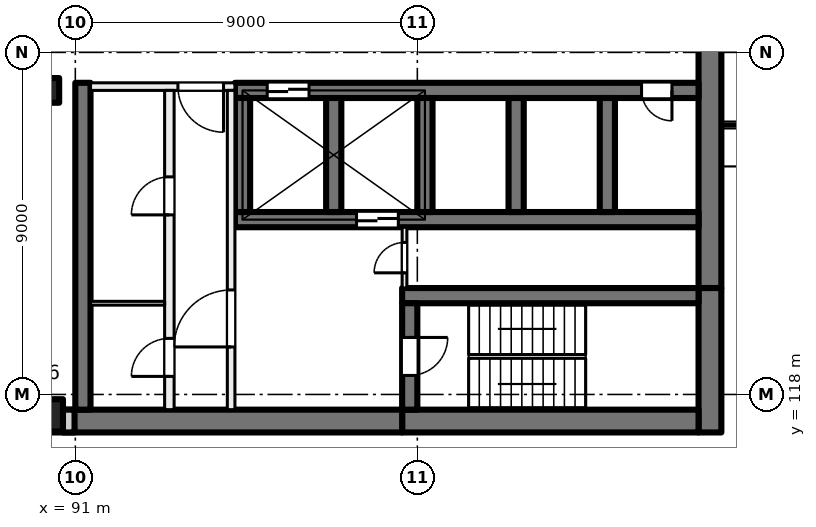
"""IFC4 building model, lengths in metres.
Left out: names, types, materials, properties, quantities, classifications, styles, units other than length and angle.
Written with IfcOpenShell. Run it as: python <this file> out.ifc"""

import sys

from ifc_helpers import new_model, si_unit, direction, frame, frame_2d, origin, origin_2d, place, context, subcontext, project, spatial, rectangle, extrude, element, fill, save


model = new_model("IFC4")
c1 = context("Model", 3, precision=1e-05, world=origin(), true_north=direction((0.0, 1.0)))
c2 = subcontext(c1, "Body", "Model", "MODEL_VIEW")
j1 = project(units=[si_unit("LENGTHUNIT", "METRE"), si_unit("PLANEANGLEUNIT", "RADIAN")], contexts=[c1])
p1 = place(None, origin())
s1 = spatial("IfcSite", under=j1, at=p1, CompositionType="ELEMENT")
p2 = place(p1, origin())
s2 = spatial("IfcBuilding", under=s1, at=p2, CompositionType="ELEMENT")
p3 = place(p2, frame((0.0, 0.0, 109.0)))
s3 = spatial("IfcBuildingStorey", under=s2, at=p3, CompositionType="ELEMENT", Elevation=109.0)
p4 = place(p3, frame((90.25, 126.0, 0.0), z_axis=(0.0, 0.0, 1.0), x_axis=(1.0, 0.0, 0.0)))
e1 = element("IfcColumn", 1, at=p4, inside=s3, PredefinedType="COLUMN", context=c2, shape_type="SweptSolid", body=[
    extrude(rectangle(XDim=0.65, YDim=0.65, at=origin_2d()), origin(), (0.0, 0.0, 1.0), 4.0),
])
p5 = place(p3, frame((90.25, 117.45, 0.0), z_axis=(0.0, 0.0, 1.0), x_axis=(1.0, 0.0, 0.0)))
e2 = element("IfcColumn", 2, at=p5, inside=s3, PredefinedType="COLUMN", context=c2, shape_type="SweptSolid", body=[
    extrude(rectangle(XDim=0.85, YDim=0.85, at=origin_2d()), origin(), (0.0, 0.0, 1.0), 4.0),
])
p6 = place(p3, frame((107.7, 135.2, 0.0), z_axis=(0.0, 0.0, 1.0), x_axis=(0.0, -1.0, 0.0)))
e3 = element("IfcWall", 3, at=p6, inside=s3, PredefinedType="SHEAR", context=c2, shape_type="SweptSolid", body=[
    extrude(rectangle(XDim=14.4, YDim=0.6, at=frame_2d((7.2, 0.0))), origin(), (0.0, 0.0, 1.0), 4.0),
])
p7 = place(p6, frame((6.3, 0.0, 0.0)))
e4 = element("IfcOpeningElement", 4, at=p7, cuts=e3, PredefinedType="OPENING", context=c2, shape_type="SweptSolid", body=[
    extrude(rectangle(XDim=1.8, YDim=2.1, at=frame_2d((0.9, 1.05))), frame((0.0, 0.31, 0.0), z_axis=(0.0, -1.0, 0.0), x_axis=(1.0, 0.0, 0.0)), (0.0, 0.0, 1.0), 0.62),
])
p8 = place(p3, frame((107.7, 120.8, 0.0), z_axis=(0.0, 0.0, 1.0), x_axis=(0.0, -1.0, 0.0)))
e5 = element("IfcWall", 5, at=p8, inside=s3, PredefinedType="SHEAR", context=c2, shape_type="SweptSolid", body=[
    extrude(rectangle(XDim=3.8, YDim=0.6, at=frame_2d((1.9, 0.0))), origin(), (0.0, 0.0, 1.0), 4.0),
])
p9 = place(p3, frame((107.4, 117.3, 0.0), z_axis=(0.0, 0.0, 1.0), x_axis=(-1.0, 0.0, 0.0)))
e6 = element("IfcWall", 6, at=p9, inside=s3, PredefinedType="SHEAR", context=c2, shape_type="SweptSolid", body=[
    extrude(rectangle(XDim=7.8, YDim=0.6, at=frame_2d((3.9, 0.0))), origin(), (0.0, 0.0, 1.0), 4.0),
])
p10 = place(p3, frame((99.6, 117.3, 0.0), z_axis=(0.0, 0.0, 1.0), x_axis=(-1.0, 0.0, 0.0)))
e7 = element("IfcWall", 7, at=p10, inside=s3, PredefinedType="SHEAR", context=c2, shape_type="SweptSolid", body=[
    extrude(rectangle(XDim=8.925, YDim=0.6, at=frame_2d((4.462, 0.0))), origin(), (0.0, 0.0, 1.0), 4.0),
])
p11 = place(p3, frame((107.4, 120.6, 0.0), z_axis=(0.0, 0.0, 1.0), x_axis=(-1.0, 0.0, 0.0)))
e8 = element("IfcWall", 8, at=p11, inside=s3, PredefinedType="SHEAR", context=c2, shape_type="SweptSolid", body=[
    extrude(rectangle(XDim=7.8, YDim=0.4, at=frame_2d((3.9, 0.0))), origin(), (0.0, 0.0, 1.0), 4.0),
])
p12 = place(p3, frame((99.8, 120.4, 0.0), z_axis=(0.0, 0.0, 1.0), x_axis=(0.0, -1.0, 0.0)))
e9 = element("IfcWall", 9, at=p12, inside=s3, PredefinedType="SHEAR", context=c2, shape_type="SweptSolid", body=[
    extrude(rectangle(XDim=2.8, YDim=0.4, at=frame_2d((1.4, 0.0))), origin(), (0.0, 0.0, 1.0), 4.0),
])
p13 = place(p12, frame((0.9, 0.0, 0.0)))
e10 = element("IfcOpeningElement", 10, at=p13, cuts=e9, PredefinedType="OPENING", context=c2, shape_type="SweptSolid", body=[
    extrude(rectangle(XDim=1.0, YDim=2.1, at=frame_2d((0.5, 1.05))), frame((0.0, 0.21, 0.0), z_axis=(0.0, -1.0, 0.0), x_axis=(1.0, 0.0, 0.0)), (0.0, 0.0, 1.0), 0.42),
])
p14 = place(p3, frame((107.4, 126.0, 0.0), z_axis=(0.0, 0.0, 1.0), x_axis=(-1.0, 0.0, 0.0)))
e11 = element("IfcWall", 11, at=p14, inside=s3, PredefinedType="SHEAR", context=c2, shape_type="SweptSolid", body=[
    extrude(rectangle(XDim=12.2, YDim=0.4, at=frame_2d((6.1, 0.0))), origin(), (0.0, 0.0, 1.0), 4.0),
])
p15 = place(p14, frame((10.25, 0.0, 0.0)))
e12 = element("IfcOpeningElement", 12, at=p15, cuts=e11, PredefinedType="OPENING", context=c2, shape_type="SweptSolid", body=[
    extrude(rectangle(XDim=1.1, YDim=2.1, at=frame_2d((0.55, 1.05))), frame((0.0, 0.21, 0.0), z_axis=(0.0, -1.0, 0.0), x_axis=(1.0, 0.0, 0.0)), (0.0, 0.0, 1.0), 0.42),
])
p16 = place(p14, frame((0.7, 0.0, 0.0)))
e13 = element("IfcOpeningElement", 13, at=p16, cuts=e11, PredefinedType="OPENING", context=c2, shape_type="SweptSolid", body=[
    extrude(rectangle(XDim=0.8, YDim=2.1, at=frame_2d((0.4, 1.05))), frame((0.0, 0.21, 0.0), z_axis=(0.0, -1.0, 0.0), x_axis=(1.0, 0.0, 0.0)), (0.0, 0.0, 1.0), 0.42),
])
p17 = place(p3, frame((107.4, 122.6, 0.0), z_axis=(0.0, 0.0, 1.0), x_axis=(-1.0, 0.0, 0.0)))
e14 = element("IfcWall", 14, at=p17, inside=s3, PredefinedType="SHEAR", context=c2, shape_type="SweptSolid", body=[
    extrude(rectangle(XDim=12.2, YDim=0.4, at=frame_2d((6.1, 0.0))), origin(), (0.0, 0.0, 1.0), 4.0),
])
p18 = place(p17, frame((7.9, 0.0, 0.0)))
e15 = element("IfcOpeningElement", 15, at=p18, cuts=e14, PredefinedType="OPENING", context=c2, shape_type="SweptSolid", body=[
    extrude(rectangle(XDim=1.1, YDim=2.1, at=frame_2d((0.55, 1.05))), frame((0.0, 0.21, 0.0), z_axis=(0.0, -1.0, 0.0), x_axis=(1.0, 0.0, 0.0)), (0.0, 0.0, 1.0), 0.42),
])
for number, where, z_axis, x_axis in (
    (16, (105.0, 125.8, 0.0), (0.0, 0.0, 1.0), (0.0, -1.0, 0.0)),
    (17, (102.6, 125.8, 0.0), (0.0, 0.0, 1.0), (0.0, -1.0, 0.0)),
    (18, (100.2, 125.8, 0.0), (0.0, 0.0, 1.0), (0.0, -1.0, 0.0)),
    (19, (97.8, 125.8, 0.0), (0.0, 0.0, 1.0), (0.0, -1.0, 0.0)),
    (20, (95.4, 125.8, 0.0), (0.0, 0.0, 1.0), (0.0, -1.0, 0.0)),
):
    element("IfcWall", number, at=place(p3, frame(where, z_axis=z_axis, x_axis=x_axis)), inside=s3, PredefinedType="SHEAR", context=c2, shape_type="SweptSolid", body=[
        extrude(rectangle(XDim=3.0, YDim=0.4, at=frame_2d((1.5, 0.0))), origin(), (0.0, 0.0, 1.0), 4.0),
    ])
p19 = place(p3, frame((91.2, 126.2, 0.0), z_axis=(0.0, 0.0, 1.0), x_axis=(0.0, -1.0, 0.0)))
e21 = element("IfcWall", 21, at=p19, inside=s3, PredefinedType="SHEAR", context=c2, shape_type="SweptSolid", body=[
    extrude(rectangle(XDim=8.6, YDim=0.4, at=frame_2d((4.3, 0.0))), origin(), (0.0, 0.0, 1.0), 4.0),
])
p20 = place(p3, frame((90.98, 117.3, 0.0), z_axis=(0.0, 0.0, 1.0), x_axis=(-1.0, 0.0, 0.0)))
e22 = element("IfcWall", 22, at=p20, inside=s3, PredefinedType="SOLIDWALL", context=c2, shape_type="SweptSolid", body=[
    extrude(rectangle(XDim=32.845, YDim=0.6, at=frame_2d((16.422, 0.0))), origin(), (0.0, 0.0, 1.0), 3.625),
])
p21 = place(p20, frame((1.48, 0.0, 0.9)))
e23 = element("IfcOpeningElement", 23, at=p21, cuts=e22, PredefinedType="OPENING", context=c2, shape_type="SweptSolid", body=[
    extrude(rectangle(XDim=3.0, YDim=2.4, at=frame_2d((1.5, 1.2))), frame((0.0, 0.31, 0.0), z_axis=(0.0, -1.0, 0.0), x_axis=(1.0, 0.0, 0.0)), (0.0, 0.0, 1.0), 0.62),
])
p22 = place(p20, frame((5.98, 0.0, 0.9)))
e24 = element("IfcOpeningElement", 24, at=p22, cuts=e22, PredefinedType="OPENING", context=c2, shape_type="SweptSolid", body=[
    extrude(rectangle(XDim=3.0, YDim=2.4, at=frame_2d((1.5, 1.2))), frame((0.0, 0.31, 0.0), z_axis=(0.0, -1.0, 0.0), x_axis=(1.0, 0.0, 0.0)), (0.0, 0.0, 1.0), 0.62),
])
p23 = place(p20, frame((10.48, 0.0, 0.9)))
e25 = element("IfcOpeningElement", 25, at=p23, cuts=e22, PredefinedType="OPENING", context=c2, shape_type="SweptSolid", body=[
    extrude(rectangle(XDim=3.0, YDim=2.4, at=frame_2d((1.5, 1.2))), frame((0.0, 0.31, 0.0), z_axis=(0.0, -1.0, 0.0), x_axis=(1.0, 0.0, 0.0)), (0.0, 0.0, 1.0), 0.62),
])
p24 = place(p20, frame((14.98, 0.0, 0.9)))
e26 = element("IfcOpeningElement", 26, at=p24, cuts=e22, PredefinedType="OPENING", context=c2, shape_type="SweptSolid", body=[
    extrude(rectangle(XDim=3.0, YDim=2.4, at=frame_2d((1.5, 1.2))), frame((0.0, 0.31, 0.0), z_axis=(0.0, -1.0, 0.0), x_axis=(1.0, 0.0, 0.0)), (0.0, 0.0, 1.0), 0.62),
])
p25 = place(p20, frame((19.48, 0.0, 0.9)))
e27 = element("IfcOpeningElement", 27, at=p25, cuts=e22, PredefinedType="OPENING", context=c2, shape_type="SweptSolid", body=[
    extrude(rectangle(XDim=3.0, YDim=2.4, at=frame_2d((1.5, 1.2))), frame((0.0, 0.31, 0.0), z_axis=(0.0, -1.0, 0.0), x_axis=(1.0, 0.0, 0.0)), (0.0, 0.0, 1.0), 0.62),
])
p26 = place(p20, frame((23.98, 0.0, 0.9)))
e28 = element("IfcOpeningElement", 28, at=p26, cuts=e22, PredefinedType="OPENING", context=c2, shape_type="SweptSolid", body=[
    extrude(rectangle(XDim=3.0, YDim=2.4, at=frame_2d((1.5, 1.2))), frame((0.0, 0.31, 0.0), z_axis=(0.0, -1.0, 0.0), x_axis=(1.0, 0.0, 0.0)), (0.0, 0.0, 1.0), 0.62),
])
p27 = place(p20, frame((28.48, 0.0, 0.9)))
e29 = element("IfcOpeningElement", 29, at=p27, cuts=e22, PredefinedType="OPENING", context=c2, shape_type="SweptSolid", body=[
    extrude(rectangle(XDim=3.0, YDim=2.4, at=frame_2d((1.5, 1.2))), frame((0.0, 0.31, 0.0), z_axis=(0.0, -1.0, 0.0), x_axis=(1.0, 0.0, 0.0)), (0.0, 0.0, 1.0), 0.62),
])
p28 = place(p3, frame((95.2, 126.1, 0.0), z_axis=(0.0, 0.0, 1.0), x_axis=(-1.0, 0.0, 0.0)))
e30 = element("IfcWall", 30, at=p28, inside=s3, PredefinedType="PARTITIONING", context=c2, shape_type="SweptSolid", body=[
    extrude(rectangle(XDim=3.8, YDim=0.2, at=frame_2d((1.9, 0.0))), origin(), (0.0, 0.0, 1.0), 3.625),
])
p29 = place(p28, frame((0.3, 0.0, 0.0)))
e31 = element("IfcOpeningElement", 31, at=p29, cuts=e30, PredefinedType="OPENING", context=c2, shape_type="SweptSolid", body=[
    extrude(rectangle(XDim=1.2, YDim=2.1, at=frame_2d((0.6, 1.05))), frame((0.0, 0.11, 0.0), z_axis=(0.0, -1.0, 0.0), x_axis=(1.0, 0.0, 0.0)), (0.0, 0.0, 1.0), 0.22),
])
p30 = place(p3, frame((95.1, 117.6, 0.0), z_axis=(0.0, 0.0, 1.0), x_axis=(0.0, 1.0, 0.0)))
e32 = element("IfcWall", 32, at=p30, inside=s3, PredefinedType="PARTITIONING", context=c2, shape_type="SweptSolid", body=[
    extrude(rectangle(XDim=8.4, YDim=0.2, at=frame_2d((4.2, 0.0))), origin(), (0.0, 0.0, 1.0), 3.625),
])
p31 = place(p30, frame((1.65, 0.0, 0.0)))
e33 = element("IfcOpeningElement", 33, at=p31, cuts=e32, PredefinedType="OPENING", context=c2, shape_type="SweptSolid", body=[
    extrude(rectangle(XDim=1.5, YDim=2.1, at=frame_2d((0.75, 1.05))), frame((0.0, 0.11, 0.0), z_axis=(0.0, -1.0, 0.0), x_axis=(1.0, 0.0, 0.0)), (0.0, 0.0, 1.0), 0.22),
])
p32 = place(p3, frame((93.475, 117.6, 0.0), z_axis=(0.0, 0.0, 1.0), x_axis=(0.0, 1.0, 0.0)))
e34 = element("IfcWall", 34, at=p32, inside=s3, PredefinedType="PARTITIONING", context=c2, shape_type="SweptSolid", body=[
    extrude(rectangle(XDim=8.4, YDim=0.25, at=frame_2d((4.2, 0.0))), origin(), (0.0, 0.0, 1.0), 3.625),
])
p33 = place(p32, frame((5.125, 0.0, 0.0)))
e35 = element("IfcOpeningElement", 35, at=p33, cuts=e34, PredefinedType="OPENING", context=c2, shape_type="SweptSolid", body=[
    extrude(rectangle(XDim=1.0, YDim=2.1, at=frame_2d((0.5, 1.05))), frame((0.0, 0.135, 0.0), z_axis=(0.0, -1.0, 0.0), x_axis=(1.0, 0.0, 0.0)), (0.0, 0.0, 1.0), 0.27),
])
p34 = place(p32, frame((0.875, 0.0, 0.0)))
e36 = element("IfcOpeningElement", 36, at=p34, cuts=e34, PredefinedType="OPENING", context=c2, shape_type="SweptSolid", body=[
    extrude(rectangle(XDim=1.0, YDim=2.1, at=frame_2d((0.5, 1.05))), frame((0.0, 0.135, 0.0), z_axis=(0.0, -1.0, 0.0), x_axis=(1.0, 0.0, 0.0)), (0.0, 0.0, 1.0), 0.27),
])
p35 = place(p3, frame((99.663, 120.8, 0.0), z_axis=(0.0, 0.0, 1.0), x_axis=(0.0, 1.0, 0.0)))
e37 = element("IfcWall", 37, at=p35, inside=s3, PredefinedType="PARTITIONING", context=c2, shape_type="SweptSolid", body=[
    extrude(rectangle(XDim=1.6, YDim=0.125, at=frame_2d((0.8, 0.0))), origin(), (0.0, 0.0, 1.0), 3.625),
])
p36 = place(p35, frame((0.4, 0.0, 0.0)))
e38 = element("IfcOpeningElement", 38, at=p36, cuts=e37, PredefinedType="OPENING", context=c2, shape_type="SweptSolid", body=[
    extrude(rectangle(XDim=0.8, YDim=2.1, at=frame_2d((0.4, 1.05))), frame((0.0, 0.073, 0.0), z_axis=(0.0, -1.0, 0.0), x_axis=(1.0, 0.0, 0.0)), (0.0, 0.0, 1.0), 0.145),
])
p37 = place(p3, frame((93.35, 120.4, 0.0), z_axis=(0.0, 0.0, 1.0), x_axis=(-1.0, 0.0, 0.0)))
e39 = element("IfcWall", 39, at=p37, inside=s3, PredefinedType="PARTITIONING", context=c2, shape_type="SweptSolid", body=[
    extrude(rectangle(XDim=1.95, YDim=0.1, at=frame_2d((0.975, 0.0))), origin(), (0.0, 0.0, 1.0), 3.625),
])
p38 = place(p15, origin())
e40 = element("IfcDoor", 40, at=p38, inside=s3, OperationType="DOUBLE_DOOR_SLIDING", PredefinedType="DOOR", context=c2, shape_type="SweptSolid", body=[
    extrude(rectangle(XDim=1.1, YDim=2.1, at=frame_2d((0.55, 1.05))), frame((0.0, 0.025, 0.0), z_axis=(0.0, -1.0, 0.0), x_axis=(1.0, 0.0, 0.0)), (0.0, 0.0, 1.0), 0.05),
])
fill(e12, e40)
p39 = place(p16, origin())
e41 = element("IfcDoor", 41, at=p39, inside=s3, OperationType="SINGLE_SWING_LEFT", PredefinedType="DOOR", context=c2, shape_type="SweptSolid", body=[
    extrude(rectangle(XDim=0.8, YDim=2.1, at=frame_2d((0.4, 1.05))), frame((0.0, 0.025, 0.0), z_axis=(0.0, -1.0, 0.0), x_axis=(1.0, 0.0, 0.0)), (0.0, 0.0, 1.0), 0.05),
])
fill(e13, e41)
p40 = place(p29, origin())
e42 = element("IfcDoor", 42, at=p40, inside=s3, OperationType="DOUBLE_DOOR_SINGLE_SWING", PredefinedType="DOOR", context=c2, shape_type="SweptSolid", body=[
    extrude(rectangle(XDim=1.2, YDim=2.1, at=frame_2d((0.6, 1.05))), frame((0.0, 0.025, 0.0), z_axis=(0.0, -1.0, 0.0), x_axis=(1.0, 0.0, 0.0)), (0.0, 0.0, 1.0), 0.05),
])
fill(e31, e42)
p41 = place(p31, origin())
e43 = element("IfcDoor", 43, at=p41, inside=s3, OperationType="DOUBLE_DOOR_SINGLE_SWING", PredefinedType="DOOR", context=c2, shape_type="SweptSolid", body=[
    extrude(rectangle(XDim=1.5, YDim=2.1, at=frame_2d((0.75, 1.05))), frame((0.0, 0.025, 0.0), z_axis=(0.0, -1.0, 0.0), x_axis=(1.0, 0.0, 0.0)), (0.0, 0.0, 1.0), 0.05),
])
fill(e33, e43)
p42 = place(p13, origin())
e44 = element("IfcDoor", 44, at=p42, inside=s3, OperationType="SINGLE_SWING_LEFT", PredefinedType="DOOR", context=c2, shape_type="SweptSolid", body=[
    extrude(rectangle(XDim=1.0, YDim=2.1, at=frame_2d((0.5, 1.05))), frame((0.0, 0.025, 0.0), z_axis=(0.0, -1.0, 0.0), x_axis=(1.0, 0.0, 0.0)), (0.0, 0.0, 1.0), 0.05),
])
fill(e10, e44)
p43 = place(p36, origin())
e45 = element("IfcDoor", 45, at=p43, inside=s3, OperationType="SINGLE_SWING_RIGHT", PredefinedType="DOOR", context=c2, shape_type="SweptSolid", body=[
    extrude(rectangle(XDim=0.8, YDim=2.1, at=frame_2d((0.4, 1.05))), frame((0.0, 0.025, 0.0), z_axis=(0.0, -1.0, 0.0), x_axis=(1.0, 0.0, 0.0)), (0.0, 0.0, 1.0), 0.05),
])
fill(e38, e45)
p44 = place(p33, origin())
e46 = element("IfcDoor", 46, at=p44, inside=s3, OperationType="SINGLE_SWING_LEFT", PredefinedType="DOOR", context=c2, shape_type="SweptSolid", body=[
    extrude(rectangle(XDim=1.0, YDim=2.1, at=frame_2d((0.5, 1.05))), frame((0.0, 0.025, 0.0), z_axis=(0.0, -1.0, 0.0), x_axis=(1.0, 0.0, 0.0)), (0.0, 0.0, 1.0), 0.05),
])
fill(e35, e46)
p45 = place(p34, origin())
e47 = element("IfcDoor", 47, at=p45, inside=s3, OperationType="SINGLE_SWING_RIGHT", PredefinedType="DOOR", context=c2, shape_type="SweptSolid", body=[
    extrude(rectangle(XDim=1.0, YDim=2.1, at=frame_2d((0.5, 1.05))), frame((0.0, 0.025, 0.0), z_axis=(0.0, -1.0, 0.0), x_axis=(1.0, 0.0, 0.0)), (0.0, 0.0, 1.0), 0.05),
])
fill(e36, e47)
p46 = place(p18, origin())
e48 = element("IfcDoor", 48, at=p46, inside=s3, OperationType="DOUBLE_DOOR_SLIDING", PredefinedType="DOOR", context=c2, shape_type="SweptSolid", body=[
    extrude(rectangle(XDim=1.1, YDim=2.1, at=frame_2d((0.55, 1.05))), frame((0.0, 0.025, 0.0), z_axis=(0.0, -1.0, 0.0), x_axis=(1.0, 0.0, 0.0)), (0.0, 0.0, 1.0), 0.05),
])
fill(e15, e48)
save(model, sys.argv[1])
